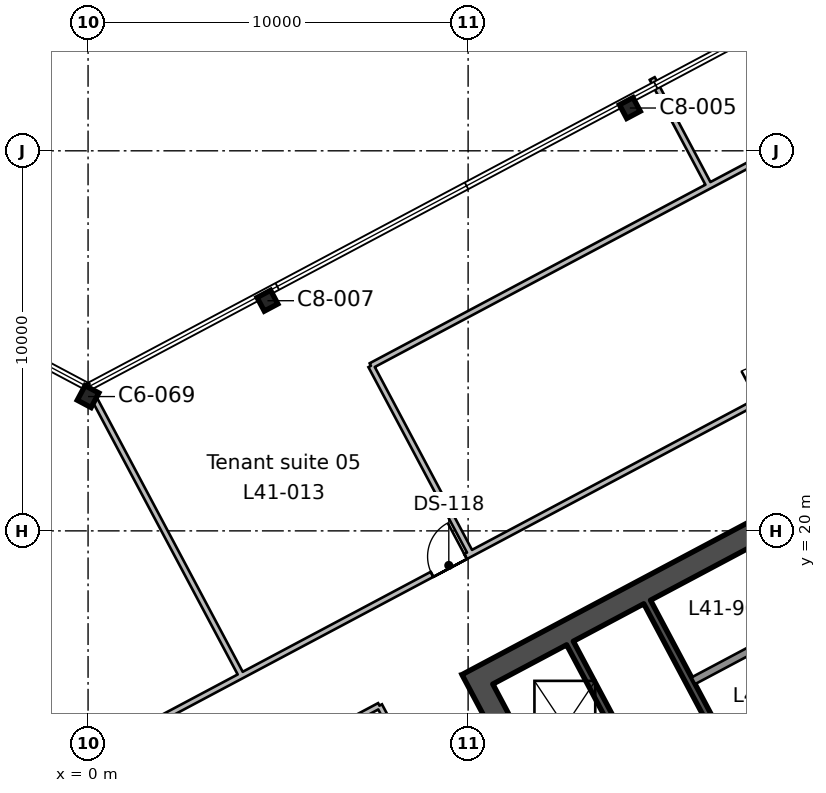
"""IFC4 building model, lengths in metres.
Left out: names, types, materials, properties, quantities, classifications, styles, units other than length and angle.
Written with IfcOpenShell. Run it as: python <this file> out.ifc"""

import sys

from ifc_helpers import new_model, si_unit, direction, frame, frame_2d, origin, origin_2d, place, context, subcontext, project, spatial, rectangle, i_section, extrude, element, fill, save


model = new_model("IFC4")
c1 = context("Model", 3, precision=1e-05, world=origin(), true_north=direction((0.0, 1.0)))
c2 = subcontext(c1, "Body", "Model", "MODEL_VIEW")
j1 = project(units=[si_unit("LENGTHUNIT", "METRE"), si_unit("PLANEANGLEUNIT", "RADIAN")], contexts=[c1])
p1 = place(None, origin())
s1 = spatial("IfcSite", under=j1, at=p1, CompositionType="ELEMENT")
p2 = place(p1, origin())
s2 = spatial("IfcBuilding", under=s1, at=p2, CompositionType="ELEMENT")
p3 = place(p2, frame((0.0, 0.0, 193.5)))
s3 = spatial("IfcBuildingStorey", under=s2, at=p3, CompositionType="ELEMENT", Elevation=193.5)
p4 = place(p3, frame((0.0, 23.534, 0.0), z_axis=(0.0, 0.0, 1.0), x_axis=(-0.882947592859, 0.469471562786, 0.0)))
e1 = element("IfcColumn", 1, at=p4, inside=s3, PredefinedType="COLUMN", context=c2, shape_type="SweptSolid", body=[
    extrude(i_section(OverallWidth=0.412, OverallDepth=0.434, WebThickness=0.036, FlangeThickness=0.057, FilletRadius=0.015, at=origin_2d()), origin(), (0.0, 0.0, 1.0), 3.9),
])
for number, where, z_axis, x_axis in (
    (2, (4.72, 26.056, 0.0), (0.0, 0.0, 1.0), (-0.883, -0.469, 0.0)),
    (3, (14.256, 31.126, 0.0), (0.0, 0.0, 1.0), (-0.883, -0.469, 0.0)),
):
    element("IfcColumn", number, at=place(p3, frame(where, z_axis=z_axis, x_axis=x_axis)), inside=s3, PredefinedType="COLUMN", context=c2, shape_type="SweptSolid", body=[
        extrude(i_section(OverallWidth=0.404, OverallDepth=0.406, WebThickness=0.027, FlangeThickness=0.044, FilletRadius=0.015, at=origin_2d()), origin(), (0.0, 0.0, 1.0), 3.9),
    ])
p5 = place(p3, frame((19.211, -0.771, 0.0), z_axis=(0.0, 0.0, 1.0), x_axis=(-0.469463742137, 0.882951751127, 0.0)))
e4 = element("IfcWall", 4, at=p5, inside=s3, PredefinedType="SHEAR", context=c2, shape_type="SweptSolid", body=[
    extrude(rectangle(XDim=19.4, YDim=0.6, at=frame_2d((9.7, 0.0))), origin(), (0.0, 0.0, 1.0), 3.9),
])
p6 = place(p5, frame((6.7, 0.0, 0.0)))
e5 = element("IfcOpeningElement", 5, at=p6, cuts=e4, PredefinedType="OPENING", context=c2, shape_type="SweptSolid", body=[
    extrude(rectangle(XDim=2.4, YDim=2.4, at=frame_2d((1.2, 1.2))), frame((0.0, 0.31, 0.0), z_axis=(0.0, -1.0, 0.0), x_axis=(1.0, 0.0, 0.0)), (0.0, 0.0, 1.0), 0.62),
])
p7 = place(p3, frame((10.509, 16.234, 0.0), z_axis=(0.0, 0.0, 1.0), x_axis=(0.88295010195, 0.469466843842, 0.0)))
e6 = element("IfcWall", 6, at=p7, inside=s3, PredefinedType="SHEAR", context=c2, shape_type="SweptSolid", body=[
    extrude(rectangle(XDim=20.2, YDim=0.6, at=frame_2d((10.1, 0.0))), origin(), (0.0, 0.0, 1.0), 3.9),
])
p8 = place(p3, frame((14.394, 13.826, 0.0), z_axis=(0.0, 0.0, 1.0), x_axis=(-0.469494272526, 0.882935517501, 0.0)))
e7 = element("IfcWall", 7, at=p8, inside=s3, PredefinedType="SHEAR", context=c2, shape_type="SweptSolid", body=[
    extrude(rectangle(XDim=3.65, YDim=0.2, at=frame_2d((1.825, 0.0))), origin(), (0.0, 0.0, 1.0), 3.9),
])
p9 = place(p3, frame((18.138, 11.683, 0.0), z_axis=(0.0, 0.0, 1.0), x_axis=(-0.469480409012, 0.88294288918, 0.0)))
e8 = element("IfcWall", 8, at=p9, inside=s3, PredefinedType="SHEAR", context=c2, shape_type="SweptSolid", body=[
    extrude(rectangle(XDim=7.3, YDim=0.2, at=frame_2d((3.65, 0.0))), origin(), (0.0, 0.0, 1.0), 3.9),
])
p10 = place(p3, frame((17.147, 13.761, 0.0), z_axis=(0.0, 0.0, 1.0), x_axis=(0.882964314875, 0.469440111896, 0.0)))
e9 = element("IfcWall", 9, at=p10, inside=s3, PredefinedType="SHEAR", context=c2, shape_type="SweptSolid", body=[
    extrude(rectangle(XDim=5.2, YDim=0.2, at=frame_2d((2.6, 0.0))), origin(), (0.0, 0.0, 1.0), 3.9),
])
p11 = place(p3, frame((15.926, 16.056, 0.0), z_axis=(0.0, 0.0, 1.0), x_axis=(0.882953967957, 0.469459572775, 0.0)))
e10 = element("IfcWall", 10, at=p11, inside=s3, PredefinedType="SOLIDWALL", context=c2, shape_type="SweptSolid", body=[
    extrude(rectangle(XDim=5.2, YDim=0.2, at=frame_2d((2.6, 0.0))), origin(), (0.0, 0.0, 1.0), 3.9),
])
p12 = place(p3, frame((-48.541, 39.854, 0.0), z_axis=(0.0, 0.0, 1.0), x_axis=(0.882945008423, -0.469476423372, 0.0)))
e11 = element("IfcWall", 11, at=p12, inside=s3, PredefinedType="PARTITIONING", context=c2, shape_type="SweptSolid", body=[
    extrude(rectangle(XDim=54.976, YDim=0.15, at=frame_2d((27.488, 0.0))), origin(), (0.0, 0.0, 1.0), 3.54),
])
p13 = place(p12, frame((26.55, 0.0, 0.0)))
e12 = element("IfcOpeningElement", 12, at=p13, cuts=e11, PredefinedType="OPENING", context=c2, shape_type="SweptSolid", body=[
    extrude(rectangle(XDim=1.8, YDim=2.1, at=frame_2d((0.9, 1.05))), frame((0.0, 0.085, 0.0), z_axis=(0.0, -1.0, 0.0), x_axis=(1.0, 0.0, 0.0)), (0.0, 0.0, 1.0), 0.17),
])
p14 = place(p12, frame((21.049, 0.0, 0.0)))
e13 = element("IfcOpeningElement", 13, at=p14, cuts=e11, PredefinedType="OPENING", context=c2, shape_type="SweptSolid", body=[
    extrude(rectangle(XDim=1.0, YDim=2.1, at=frame_2d((0.5, 1.05))), frame((0.0, 0.085, 0.0), z_axis=(0.0, -1.0, 0.0), x_axis=(1.0, 0.0, 0.0)), (0.0, 0.0, 1.0), 0.17),
])
p15 = place(p12, frame((15.35, 0.0, 0.0)))
e14 = element("IfcOpeningElement", 14, at=p15, cuts=e11, PredefinedType="OPENING", context=c2, shape_type="SweptSolid", body=[
    extrude(rectangle(XDim=1.0, YDim=2.1, at=frame_2d((0.5, 1.05))), frame((0.0, 0.085, 0.0), z_axis=(0.0, -1.0, 0.0), x_axis=(1.0, 0.0, 0.0)), (0.0, 0.0, 1.0), 0.17),
])
p16 = place(p3, frame((0.0, 14.044, 0.0), z_axis=(0.0, 0.0, 1.0), x_axis=(0.882962129795, 0.469444221764, 0.0)))
e15 = element("IfcWall", 15, at=p16, inside=s3, PredefinedType="PARTITIONING", context=c2, shape_type="SweptSolid", body=[
    extrude(rectangle(XDim=41.607, YDim=0.15, at=frame_2d((20.803, 0.0))), origin(), (0.0, 0.0, 1.0), 3.54),
])
p17 = place(p16, frame((19.95, 0.0, 0.0)))
e16 = element("IfcOpeningElement", 16, at=p17, cuts=e15, PredefinedType="OPENING", context=c2, shape_type="SweptSolid", body=[
    extrude(rectangle(XDim=1.8, YDim=2.1, at=frame_2d((0.9, 1.05))), frame((0.0, 0.085, 0.0), z_axis=(0.0, -1.0, 0.0), x_axis=(1.0, 0.0, 0.0)), (0.0, 0.0, 1.0), 0.17),
])
p18 = place(p16, frame((10.25, 0.0, 0.0)))
e17 = element("IfcOpeningElement", 17, at=p18, cuts=e15, PredefinedType="OPENING", context=c2, shape_type="SweptSolid", body=[
    extrude(rectangle(XDim=1.0, YDim=2.1, at=frame_2d((0.5, 1.05))), frame((0.0, 0.085, 0.0), z_axis=(0.0, -1.0, 0.0), x_axis=(1.0, 0.0, 0.0)), (0.0, 0.0, 1.0), 0.17),
])
p19 = place(p3, frame((0.183, 23.44, 0.0), z_axis=(0.0, 0.0, 1.0), x_axis=(0.469529135479, -0.882916978507, 0.0)))
e18 = element("IfcWall", 18, at=p19, inside=s3, PredefinedType="PARTITIONING", context=c2, shape_type="SweptSolid", body=[
    extrude(rectangle(XDim=8.21, YDim=0.15, at=frame_2d((4.105, 0.0))), origin(), (0.0, 0.0, 1.0), 3.54),
])
p20 = place(p3, frame((7.443, 24.344, 0.0), z_axis=(0.0, 0.0, 1.0), x_axis=(0.46934602066, -0.883014333344, 0.0)))
e19 = element("IfcWall", 19, at=p20, inside=s3, PredefinedType="PARTITIONING", context=c2, shape_type="SweptSolid", body=[
    extrude(rectangle(XDim=5.582, YDim=0.15, at=frame_2d((2.791, 0.0))), origin(), (0.0, 0.0, 1.0), 3.54),
])
p21 = place(p3, frame((7.443, 24.343, 0.0), z_axis=(0.0, 0.0, 1.0), x_axis=(0.882919378886, 0.469524621705, 0.0)))
e20 = element("IfcWall", 20, at=p21, inside=s3, PredefinedType="PARTITIONING", context=c2, shape_type="SweptSolid", body=[
    extrude(rectangle(XDim=10.082, YDim=0.15, at=frame_2d((5.041, 0.0))), origin(), (0.0, 0.0, 1.0), 3.54),
])
p22 = place(p3, frame((14.844, 31.903, 0.0), z_axis=(0.0, 0.0, 1.0), x_axis=(0.469051096607, -0.883171030306, 0.0)))
e21 = element("IfcWall", 21, at=p22, inside=s3, PredefinedType="PARTITIONING", context=c2, shape_type="SweptSolid", body=[
    extrude(rectangle(XDim=3.2, YDim=0.15, at=frame_2d((1.6, 0.0))), origin(), (0.0, 0.0, 1.0), 3.54),
])
p23 = place(p3, frame((16.345, 29.077, 0.0), z_axis=(0.0, 0.0, 1.0), x_axis=(0.882962129602, 0.469444222128, 0.0)))
e22 = element("IfcWall", 22, at=p23, inside=s3, PredefinedType="PARTITIONING", context=c2, shape_type="SweptSolid", body=[
    extrude(rectangle(XDim=13.917, YDim=0.15, at=frame_2d((6.958, 0.0))), origin(), (0.0, 0.0, 1.0), 3.54),
])
p24 = place(p3, frame((8.518, 13.8, 0.0), z_axis=(0.0, 0.0, 1.0), x_axis=(-0.469148666032, 0.883119204389, 0.0)))
e23 = element("IfcWall", 23, at=p24, inside=s3, PredefinedType="PARTITIONING", context=c2, shape_type="SweptSolid", body=[
    extrude(rectangle(XDim=1.814, YDim=0.15, at=frame_2d((0.907, 0.0))), origin(), (0.0, 0.0, 1.0), 3.54),
])
p25 = place(p3, frame((7.667, 15.402, 0.0), z_axis=(0.0, 0.0, 1.0), x_axis=(-0.883005489543, -0.469362658759, 0.0)))
e24 = element("IfcWall", 24, at=p25, inside=s3, PredefinedType="PARTITIONING", context=c2, shape_type="SweptSolid", body=[
    extrude(rectangle(XDim=3.413, YDim=0.15, at=frame_2d((1.707, 0.0))), origin(), (0.0, 0.0, 1.0), 3.54),
])
p26 = place(p18, origin())
e25 = element("IfcDoor", 25, at=p26, inside=s3, OperationType="SINGLE_SWING_RIGHT", PredefinedType="DOOR", context=c2, shape_type="SweptSolid", body=[
    extrude(rectangle(XDim=1.0, YDim=2.1, at=frame_2d((0.5, 1.05))), frame((0.0, 0.025, 0.0), z_axis=(0.0, -1.0, 0.0), x_axis=(1.0, 0.0, 0.0)), (0.0, 0.0, 1.0), 0.05),
])
fill(e17, e25)
save(model, sys.argv[1])
